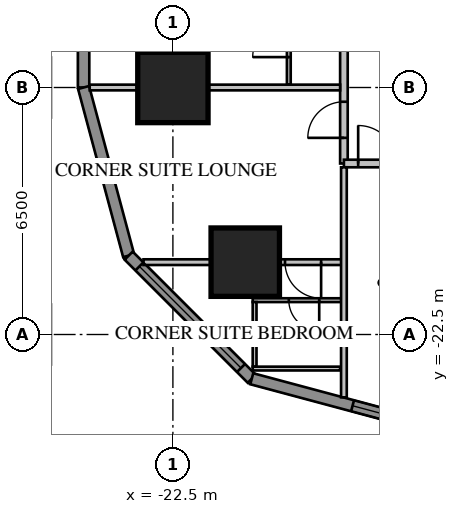
"""IFC4 building model, lengths in metres.
Left out: names, types, materials, properties, quantities, classifications, styles, units other than length and angle.
Written with IfcOpenShell. Run it as: python <this file> out.ifc"""

import sys

from ifc_helpers import new_model, si_unit, direction, frame, frame_2d, origin, origin_2d, place, context, subcontext, project, spatial, rectangle, extrude, element, fill, save


model = new_model("IFC4")
c1 = context("Model", 3, precision=1e-05, world=origin(), true_north=direction((0.0, 1.0)))
c2 = subcontext(c1, "Body", "Model", "MODEL_VIEW")
j1 = project(units=[si_unit("LENGTHUNIT", "METRE"), si_unit("PLANEANGLEUNIT", "RADIAN")], contexts=[c1])
p1 = place(None, origin())
s1 = spatial("IfcSite", under=j1, at=p1, CompositionType="ELEMENT")
p2 = place(p1, origin())
s2 = spatial("IfcBuilding", under=s1, at=p2, CompositionType="ELEMENT")
p3 = place(p2, frame((0.0, 0.0, 31.4)))
s3 = spatial("IfcBuildingStorey", under=s2, at=p3, CompositionType="ELEMENT", Elevation=31.4)
p4 = place(p3, frame((-22.5, -16.0, 0.0), z_axis=(0.0, 0.0, 1.0), x_axis=(1.0, 0.0, 0.0)))
e1 = element("IfcColumn", 1, at=p4, inside=s3, PredefinedType="COLUMN", context=c2, shape_type="SweptSolid", body=[
    extrude(rectangle(XDim=1.85, YDim=1.85, at=origin_2d()), origin(), (0.0, 0.0, 1.0), 3.85),
])
p5 = place(p3, frame((-20.596, -20.596, 0.0), z_axis=(0.0, 0.0, 1.0), x_axis=(1.0, 0.0, 0.0)))
e2 = element("IfcColumn", 2, at=p5, inside=s3, PredefinedType="COLUMN", context=c2, shape_type="SweptSolid", body=[
    extrude(rectangle(XDim=1.8, YDim=1.8, at=origin_2d()), origin(), (0.0, 0.0, 1.0), 3.85),
])
p6 = place(p3, frame((-24.85, 16.0, 0.0), z_axis=(0.0, 0.0, 1.0), x_axis=(0.0, -1.0, 0.0)))
e3 = element("IfcWall", 3, at=p6, inside=s3, PredefinedType="SOLIDWALL", context=c2, shape_type="SweptSolid", body=[
    extrude(rectangle(XDim=32.0, YDim=0.3, at=frame_2d((16.0, 0.0))), origin(), (0.0, 0.0, 1.0), 3.65),
])
p7 = place(p6, frame((1.2, 0.0, 0.75)))
e4 = element("IfcOpeningElement", 4, at=p7, cuts=e3, PredefinedType="OPENING", context=c2, shape_type="SweptSolid", body=[
    extrude(rectangle(XDim=1.6, YDim=1.8, at=frame_2d((0.8, 0.9))), frame((0.0, 0.17, 0.0), z_axis=(0.0, -1.0, 0.0), x_axis=(1.0, 0.0, 0.0)), (0.0, 0.0, 1.0), 0.34),
])
p8 = place(p6, frame((5.2, 0.0, 0.75)))
e5 = element("IfcOpeningElement", 5, at=p8, cuts=e3, PredefinedType="OPENING", context=c2, shape_type="SweptSolid", body=[
    extrude(rectangle(XDim=1.6, YDim=1.8, at=frame_2d((0.8, 0.9))), frame((0.0, 0.17, 0.0), z_axis=(0.0, -1.0, 0.0), x_axis=(1.0, 0.0, 0.0)), (0.0, 0.0, 1.0), 0.34),
])
p9 = place(p6, frame((17.2, 0.0, 0.75)))
e6 = element("IfcOpeningElement", 6, at=p9, cuts=e3, PredefinedType="OPENING", context=c2, shape_type="SweptSolid", body=[
    extrude(rectangle(XDim=1.6, YDim=1.8, at=frame_2d((0.8, 0.9))), frame((0.0, 0.17, 0.0), z_axis=(0.0, -1.0, 0.0), x_axis=(1.0, 0.0, 0.0)), (0.0, 0.0, 1.0), 0.34),
])
p10 = place(p6, frame((21.2, 0.0, 0.75)))
e7 = element("IfcOpeningElement", 7, at=p10, cuts=e3, PredefinedType="OPENING", context=c2, shape_type="SweptSolid", body=[
    extrude(rectangle(XDim=1.6, YDim=1.8, at=frame_2d((0.8, 0.9))), frame((0.0, 0.17, 0.0), z_axis=(0.0, -1.0, 0.0), x_axis=(1.0, 0.0, 0.0)), (0.0, 0.0, 1.0), 0.34),
])
p11 = place(p6, frame((25.2, 0.0, 0.75)))
e8 = element("IfcOpeningElement", 8, at=p11, cuts=e3, PredefinedType="OPENING", context=c2, shape_type="SweptSolid", body=[
    extrude(rectangle(XDim=1.6, YDim=1.8, at=frame_2d((0.8, 0.9))), frame((0.0, 0.17, 0.0), z_axis=(0.0, -1.0, 0.0), x_axis=(1.0, 0.0, 0.0)), (0.0, 0.0, 1.0), 0.34),
])
p12 = place(p6, frame((29.2, 0.0, 0.75)))
e9 = element("IfcOpeningElement", 9, at=p12, cuts=e3, PredefinedType="OPENING", context=c2, shape_type="SweptSolid", body=[
    extrude(rectangle(XDim=1.6, YDim=1.8, at=frame_2d((0.8, 0.9))), frame((0.0, 0.17, 0.0), z_axis=(0.0, -1.0, 0.0), x_axis=(1.0, 0.0, 0.0)), (0.0, 0.0, 1.0), 0.34),
])
p13 = place(p6, frame((8.8, 0.0, 0.75)))
e10 = element("IfcOpeningElement", 10, at=p13, cuts=e3, PredefinedType="OPENING", context=c2, shape_type="SweptSolid", body=[
    extrude(rectangle(XDim=2.4, YDim=1.8, at=frame_2d((1.2, 0.9))), frame((0.0, 0.17, 0.0), z_axis=(0.0, -1.0, 0.0), x_axis=(1.0, 0.0, 0.0)), (0.0, 0.0, 1.0), 0.34),
])
p14 = place(p6, frame((13.812, 0.0, 0.0)))
e11 = element("IfcOpeningElement", 11, at=p14, cuts=e3, PredefinedType="OPENING", context=c2, shape_type="SweptSolid", body=[
    extrude(rectangle(XDim=1.0, YDim=2.4, at=frame_2d((0.5, 1.2))), frame((0.0, 0.17, 0.0), z_axis=(0.0, -1.0, 0.0), x_axis=(1.0, 0.0, 0.0)), (0.0, 0.0, 1.0), 0.34),
])
p15 = place(p3, frame((-24.85, -16.0, 0.0), z_axis=(0.0, 0.0, 1.0), x_axis=(0.258839972501, -0.965920218567, 0.0)))
e12 = element("IfcWall", 12, at=p15, inside=s3, PredefinedType="SOLIDWALL", context=c2, shape_type="SweptSolid", body=[
    extrude(rectangle(XDim=4.581, YDim=0.3, at=frame_2d((2.291, 0.0))), origin(), (0.0, 0.0, 1.0), 3.65),
])
p16 = place(p3, frame((-23.664, -20.425, 0.0), z_axis=(0.0, 0.0, 1.0), x_axis=(0.707106781187, -0.707106781187, 0.0)))
e13 = element("IfcWall", 13, at=p16, inside=s3, PredefinedType="SOLIDWALL", context=c2, shape_type="SweptSolid", body=[
    extrude(rectangle(XDim=4.581, YDim=0.3, at=frame_2d((2.291, 0.0))), origin(), (0.0, 0.0, 1.0), 3.65),
])
p17 = place(p16, frame((0.4, 0.0, 0.75)))
e14 = element("IfcOpeningElement", 14, at=p17, cuts=e13, PredefinedType="OPENING", context=c2, shape_type="SweptSolid", body=[
    extrude(rectangle(XDim=3.781, YDim=1.8, at=frame_2d((1.891, 0.9))), frame((0.0, 0.17, 0.0), z_axis=(0.0, -1.0, 0.0), x_axis=(1.0, 0.0, 0.0)), (0.0, 0.0, 1.0), 0.34),
])
p18 = place(p3, frame((-20.425, -23.664, 0.0), z_axis=(0.0, 0.0, 1.0), x_axis=(0.965920218567, -0.258839972501, 0.0)))
e15 = element("IfcWall", 15, at=p18, inside=s3, PredefinedType="SOLIDWALL", context=c2, shape_type="SweptSolid", body=[
    extrude(rectangle(XDim=4.581, YDim=0.3, at=frame_2d((2.291, 0.0))), origin(), (0.0, 0.0, 1.0), 3.65),
])
p19 = place(p18, frame((2.746, 0.0, 0.75)))
e16 = element("IfcOpeningElement", 16, at=p19, cuts=e15, PredefinedType="OPENING", context=c2, shape_type="SweptSolid", body=[
    extrude(rectangle(XDim=1.6, YDim=1.8, at=frame_2d((0.8, 0.9))), frame((0.0, 0.17, 0.0), z_axis=(0.0, -1.0, 0.0), x_axis=(1.0, 0.0, 0.0)), (0.0, 0.0, 1.0), 0.34),
])
p20 = place(p3, frame((-18.0, 18.0, 0.0), z_axis=(0.0, 0.0, 1.0), x_axis=(0.0, -1.0, 0.0)))
e17 = element("IfcWall", 17, at=p20, inside=s3, PredefinedType="PARTITIONING", context=c2, shape_type="SweptSolid", body=[
    extrude(rectangle(XDim=36.0, YDim=0.2, at=frame_2d((18.0, 0.0))), origin(), (0.0, 0.0, 1.0), 3.65),
])
p21 = place(p20, frame((10.4, 0.0, 0.0)))
e18 = element("IfcOpeningElement", 18, at=p21, cuts=e17, PredefinedType="OPENING", context=c2, shape_type="SweptSolid", body=[
    extrude(rectangle(XDim=1.0, YDim=2.1, at=frame_2d((0.5, 1.05))), frame((0.0, 0.12, 0.0), z_axis=(0.0, -1.0, 0.0), x_axis=(1.0, 0.0, 0.0)), (0.0, 0.0, 1.0), 0.24),
])
p22 = place(p20, frame((0.375, 0.0, 0.0)))
e19 = element("IfcOpeningElement", 19, at=p22, cuts=e17, PredefinedType="OPENING", context=c2, shape_type="SweptSolid", body=[
    extrude(rectangle(XDim=1.0, YDim=2.1, at=frame_2d((0.5, 1.05))), frame((0.0, 0.12, 0.0), z_axis=(0.0, -1.0, 0.0), x_axis=(1.0, 0.0, 0.0)), (0.0, 0.0, 1.0), 0.24),
])
p23 = place(p20, frame((34.375, 0.0, 0.0)))
e20 = element("IfcOpeningElement", 20, at=p23, cuts=e17, PredefinedType="OPENING", context=c2, shape_type="SweptSolid", body=[
    extrude(rectangle(XDim=0.95, YDim=2.1, at=frame_2d((0.475, 1.05))), frame((0.0, 0.12, 0.0), z_axis=(0.0, -1.0, 0.0), x_axis=(1.0, 0.0, 0.0)), (0.0, 0.0, 1.0), 0.24),
])
p24 = place(p3, frame((-19.45, 15.925, 0.0), z_axis=(0.0, 0.0, 1.0), x_axis=(0.0, -1.0, 0.0)))
e21 = element("IfcWall", 21, at=p24, inside=s3, PredefinedType="PARTITIONING", context=c2, shape_type="SweptSolid", body=[
    extrude(rectangle(XDim=31.85, YDim=0.1, at=frame_2d((15.925, 0.0))), origin(), (0.0, 0.0, 1.0), 3.65),
])
p25 = place(p24, frame((10.125, 0.0, 0.0)))
e22 = element("IfcOpeningElement", 22, at=p25, cuts=e21, PredefinedType="OPENING", context=c2, shape_type="SweptSolid", body=[
    extrude(rectangle(XDim=1.0, YDim=2.1, at=frame_2d((0.5, 1.05))), frame((0.0, 0.07, 0.0), z_axis=(0.0, -1.0, 0.0), x_axis=(1.0, 0.0, 0.0)), (0.0, 0.0, 1.0), 0.14),
])
p26 = place(p24, frame((8.3, 0.0, 0.0)))
e23 = element("IfcOpeningElement", 23, at=p26, cuts=e21, PredefinedType="OPENING", context=c2, shape_type="SweptSolid", body=[
    extrude(rectangle(XDim=0.8, YDim=2.1, at=frame_2d((0.4, 1.05))), frame((0.0, 0.07, 0.0), z_axis=(0.0, -1.0, 0.0), x_axis=(1.0, 0.0, 0.0)), (0.0, 0.0, 1.0), 0.14),
])
p27 = place(p24, frame((0.3, 0.0, 0.0)))
e24 = element("IfcOpeningElement", 24, at=p27, cuts=e21, PredefinedType="OPENING", context=c2, shape_type="SweptSolid", body=[
    extrude(rectangle(XDim=0.95, YDim=2.1, at=frame_2d((0.475, 1.05))), frame((0.0, 0.07, 0.0), z_axis=(0.0, -1.0, 0.0), x_axis=(1.0, 0.0, 0.0)), (0.0, 0.0, 1.0), 0.14),
])
p28 = place(p24, frame((6.175, 0.0, 0.0)))
e25 = element("IfcOpeningElement", 25, at=p28, cuts=e21, PredefinedType="OPENING", context=c2, shape_type="SweptSolid", body=[
    extrude(rectangle(XDim=0.95, YDim=2.1, at=frame_2d((0.475, 1.05))), frame((0.0, 0.07, 0.0), z_axis=(0.0, -1.0, 0.0), x_axis=(1.0, 0.0, 0.0)), (0.0, 0.0, 1.0), 0.14),
])
p29 = place(p24, frame((16.3, 0.0, 0.0)))
e26 = element("IfcOpeningElement", 26, at=p29, cuts=e21, PredefinedType="OPENING", context=c2, shape_type="SweptSolid", body=[
    extrude(rectangle(XDim=0.95, YDim=2.1, at=frame_2d((0.475, 1.05))), frame((0.0, 0.07, 0.0), z_axis=(0.0, -1.0, 0.0), x_axis=(1.0, 0.0, 0.0)), (0.0, 0.0, 1.0), 0.14),
])
p30 = place(p24, frame((22.175, 0.0, 0.0)))
e27 = element("IfcOpeningElement", 27, at=p30, cuts=e21, PredefinedType="OPENING", context=c2, shape_type="SweptSolid", body=[
    extrude(rectangle(XDim=0.95, YDim=2.1, at=frame_2d((0.475, 1.05))), frame((0.0, 0.07, 0.0), z_axis=(0.0, -1.0, 0.0), x_axis=(1.0, 0.0, 0.0)), (0.0, 0.0, 1.0), 0.14),
])
p31 = place(p24, frame((24.3, 0.0, 0.0)))
e28 = element("IfcOpeningElement", 28, at=p31, cuts=e21, PredefinedType="OPENING", context=c2, shape_type="SweptSolid", body=[
    extrude(rectangle(XDim=0.95, YDim=2.1, at=frame_2d((0.475, 1.05))), frame((0.0, 0.07, 0.0), z_axis=(0.0, -1.0, 0.0), x_axis=(1.0, 0.0, 0.0)), (0.0, 0.0, 1.0), 0.14),
])
p32 = place(p24, frame((30.175, 0.0, 0.0)))
e29 = element("IfcOpeningElement", 29, at=p32, cuts=e21, PredefinedType="OPENING", context=c2, shape_type="SweptSolid", body=[
    extrude(rectangle(XDim=0.95, YDim=2.1, at=frame_2d((0.475, 1.05))), frame((0.0, 0.07, 0.0), z_axis=(0.0, -1.0, 0.0), x_axis=(1.0, 0.0, 0.0)), (0.0, 0.0, 1.0), 0.14),
])
p33 = place(p3, frame((-18.1, -16.0, 0.0), z_axis=(0.0, 0.0, 1.0), x_axis=(-1.0, 0.0, 0.0)))
e30 = element("IfcWall", 30, at=p33, inside=s3, PredefinedType="PARTITIONING", context=c2, shape_type="SweptSolid", body=[
    extrude(rectangle(XDim=6.589, YDim=0.15, at=frame_2d((3.295, 0.0))), origin(), (0.0, 0.0, 1.0), 3.65),
])
p34 = place(p3, frame((-18.065, -21.596, 0.0), z_axis=(0.0, 0.0, 1.0), x_axis=(-1.0, 0.0, 0.0)))
e31 = element("IfcWall", 31, at=p34, inside=s3, PredefinedType="PARTITIONING", context=c2, shape_type="SweptSolid", body=[
    extrude(rectangle(XDim=2.335, YDim=0.1, at=frame_2d((1.167, 0.0))), origin(), (0.0, 0.0, 1.0), 3.65),
])
p35 = place(p34, frame((0.585, 0.0, 0.0)))
e32 = element("IfcOpeningElement", 32, at=p35, cuts=e31, PredefinedType="OPENING", context=c2, shape_type="SweptSolid", body=[
    extrude(rectangle(XDim=0.8, YDim=2.1, at=frame_2d((0.4, 1.05))), frame((0.0, 0.07, 0.0), z_axis=(0.0, -1.0, 0.0), x_axis=(1.0, 0.0, 0.0)), (0.0, 0.0, 1.0), 0.14),
])
p36 = place(p3, frame((-20.35, -21.646, 0.0), z_axis=(0.0, 0.0, 1.0), x_axis=(0.0, -1.0, 0.0)))
e33 = element("IfcWall", 33, at=p36, inside=s3, PredefinedType="PARTITIONING", context=c2, shape_type="SweptSolid", body=[
    extrude(rectangle(XDim=1.7, YDim=0.1, at=frame_2d((0.85, 0.0))), origin(), (0.0, 0.0, 1.0), 3.65),
])
p37 = place(p3, frame((-18.1, -23.396, 0.0), z_axis=(0.0, 0.0, 1.0), x_axis=(-1.0, 0.0, 0.0)))
e34 = element("IfcWall", 34, at=p37, inside=s3, PredefinedType="PARTITIONING", context=c2, shape_type="SweptSolid", body=[
    extrude(rectangle(XDim=2.3, YDim=0.1, at=frame_2d((1.15, 0.0))), origin(), (0.0, 0.0, 1.0), 3.65),
])
p38 = place(p3, frame((-18.065, -20.596, 0.0), z_axis=(0.0, 0.0, 1.0), x_axis=(-1.0, 0.0, 0.0)))
e35 = element("IfcWall", 35, at=p38, inside=s3, PredefinedType="PARTITIONING", context=c2, shape_type="SweptSolid", body=[
    extrude(rectangle(XDim=5.209, YDim=0.15, at=frame_2d((2.604, 0.0))), origin(), (0.0, 0.0, 1.0), 3.65),
])
p39 = place(p38, frame((0.535, 0.0, 0.0)))
e36 = element("IfcOpeningElement", 36, at=p39, cuts=e35, PredefinedType="OPENING", context=c2, shape_type="SweptSolid", body=[
    extrude(rectangle(XDim=0.95, YDim=2.1, at=frame_2d((0.475, 1.05))), frame((0.0, 0.095, 0.0), z_axis=(0.0, -1.0, 0.0), x_axis=(1.0, 0.0, 0.0)), (0.0, 0.0, 1.0), 0.19),
])
p40 = place(p3, frame((-18.0, -18.0, 0.0), z_axis=(0.0, 0.0, 1.0), x_axis=(1.0, 0.0, 0.0)))
e37 = element("IfcWall", 37, at=p40, inside=s3, PredefinedType="PARTITIONING", context=c2, shape_type="SweptSolid", body=[
    extrude(rectangle(XDim=36.0, YDim=0.2, at=frame_2d((18.0, 0.0))), origin(), (0.0, 0.0, 1.0), 3.65),
])
p41 = place(p40, frame((0.375, 0.0, 0.0)))
e38 = element("IfcOpeningElement", 38, at=p41, cuts=e37, PredefinedType="OPENING", context=c2, shape_type="SweptSolid", body=[
    extrude(rectangle(XDim=1.0, YDim=2.1, at=frame_2d((0.5, 1.05))), frame((0.0, 0.12, 0.0), z_axis=(0.0, -1.0, 0.0), x_axis=(1.0, 0.0, 0.0)), (0.0, 0.0, 1.0), 0.24),
])
p42 = place(p40, frame((2.45, 0.0, 0.0)))
e39 = element("IfcOpeningElement", 39, at=p42, cuts=e37, PredefinedType="OPENING", context=c2, shape_type="SweptSolid", body=[
    extrude(rectangle(XDim=0.8, YDim=2.1, at=frame_2d((0.4, 1.05))), frame((0.0, 0.12, 0.0), z_axis=(0.0, -1.0, 0.0), x_axis=(1.0, 0.0, 0.0)), (0.0, 0.0, 1.0), 0.24),
])
p43 = place(p40, frame((4.05, 0.0, 0.0)))
e40 = element("IfcOpeningElement", 40, at=p43, cuts=e37, PredefinedType="OPENING", context=c2, shape_type="SweptSolid", body=[
    extrude(rectangle(XDim=1.0, YDim=2.1, at=frame_2d((0.5, 1.05))), frame((0.0, 0.12, 0.0), z_axis=(0.0, -1.0, 0.0), x_axis=(1.0, 0.0, 0.0)), (0.0, 0.0, 1.0), 0.24),
])
p44 = place(p40, frame((6.45, 0.0, 0.0)))
e41 = element("IfcOpeningElement", 41, at=p44, cuts=e37, PredefinedType="OPENING", context=c2, shape_type="SweptSolid", body=[
    extrude(rectangle(XDim=0.9, YDim=2.1, at=frame_2d((0.45, 1.05))), frame((0.0, 0.12, 0.0), z_axis=(0.0, -1.0, 0.0), x_axis=(1.0, 0.0, 0.0)), (0.0, 0.0, 1.0), 0.24),
])
p45 = place(p40, frame((8.15, 0.0, 0.0)))
e42 = element("IfcOpeningElement", 42, at=p45, cuts=e37, PredefinedType="OPENING", context=c2, shape_type="SweptSolid", body=[
    extrude(rectangle(XDim=1.0, YDim=2.1, at=frame_2d((0.5, 1.05))), frame((0.0, 0.12, 0.0), z_axis=(0.0, -1.0, 0.0), x_axis=(1.0, 0.0, 0.0)), (0.0, 0.0, 1.0), 0.24),
])
p46 = place(p40, frame((18.375, 0.0, 0.0)))
e43 = element("IfcOpeningElement", 43, at=p46, cuts=e37, PredefinedType="OPENING", context=c2, shape_type="SweptSolid", body=[
    extrude(rectangle(XDim=0.95, YDim=2.1, at=frame_2d((0.475, 1.05))), frame((0.0, 0.12, 0.0), z_axis=(0.0, -1.0, 0.0), x_axis=(1.0, 0.0, 0.0)), (0.0, 0.0, 1.0), 0.24),
])
p47 = place(p40, frame((24.25, 0.0, 0.0)))
e44 = element("IfcOpeningElement", 44, at=p47, cuts=e37, PredefinedType="OPENING", context=c2, shape_type="SweptSolid", body=[
    extrude(rectangle(XDim=0.95, YDim=2.1, at=frame_2d((0.475, 1.05))), frame((0.0, 0.12, 0.0), z_axis=(0.0, -1.0, 0.0), x_axis=(1.0, 0.0, 0.0)), (0.0, 0.0, 1.0), 0.24),
])
p48 = place(p40, frame((26.375, 0.0, 0.0)))
e45 = element("IfcOpeningElement", 45, at=p48, cuts=e37, PredefinedType="OPENING", context=c2, shape_type="SweptSolid", body=[
    extrude(rectangle(XDim=0.95, YDim=2.1, at=frame_2d((0.475, 1.05))), frame((0.0, 0.12, 0.0), z_axis=(0.0, -1.0, 0.0), x_axis=(1.0, 0.0, 0.0)), (0.0, 0.0, 1.0), 0.24),
])
p49 = place(p40, frame((32.25, 0.0, 0.0)))
e46 = element("IfcOpeningElement", 46, at=p49, cuts=e37, PredefinedType="OPENING", context=c2, shape_type="SweptSolid", body=[
    extrude(rectangle(XDim=0.95, YDim=2.1, at=frame_2d((0.475, 1.05))), frame((0.0, 0.12, 0.0), z_axis=(0.0, -1.0, 0.0), x_axis=(1.0, 0.0, 0.0)), (0.0, 0.0, 1.0), 0.24),
])
p50 = place(p40, frame((34.375, 0.0, 0.0)))
e47 = element("IfcOpeningElement", 47, at=p50, cuts=e37, PredefinedType="OPENING", context=c2, shape_type="SweptSolid", body=[
    extrude(rectangle(XDim=0.95, YDim=2.1, at=frame_2d((0.475, 1.05))), frame((0.0, 0.12, 0.0), z_axis=(0.0, -1.0, 0.0), x_axis=(1.0, 0.0, 0.0)), (0.0, 0.0, 1.0), 0.24),
])
p51 = place(p40, frame((11.2, 0.0, 0.0)))
e48 = element("IfcOpeningElement", 48, at=p51, cuts=e37, PredefinedType="OPENING", context=c2, shape_type="SweptSolid", body=[
    extrude(rectangle(XDim=1.0, YDim=2.1, at=frame_2d((0.5, 1.05))), frame((0.0, 0.12, 0.0), z_axis=(0.0, -1.0, 0.0), x_axis=(1.0, 0.0, 0.0)), (0.0, 0.0, 1.0), 0.24),
])
p52 = place(p3, frame((-18.0, -18.1, 0.0), z_axis=(0.0, 0.0, 1.0), x_axis=(0.0, -1.0, 0.0)))
e49 = element("IfcWall", 49, at=p52, inside=s3, PredefinedType="PARTITIONING", context=c2, shape_type="SweptSolid", body=[
    extrude(rectangle(XDim=6.053, YDim=0.15, at=frame_2d((3.027, 0.0))), origin(), (0.0, 0.0, 1.0), 3.65),
])
p53 = place(p17, origin())
e50 = element("IfcWindow", 50, at=p53, inside=s3, PartitioningType="SINGLE_PANEL", PredefinedType="WINDOW", context=c2, shape_type="SweptSolid", body=[
    extrude(rectangle(XDim=3.781, YDim=1.8, at=frame_2d((1.891, 0.9))), frame((0.0, 0.03, 0.0), z_axis=(0.0, -1.0, 0.0), x_axis=(1.0, 0.0, 0.0)), (0.0, 0.0, 1.0), 0.06),
])
fill(e14, e50)
p54 = place(p19, origin())
e51 = element("IfcWindow", 51, at=p54, inside=s3, PartitioningType="SINGLE_PANEL", PredefinedType="WINDOW", context=c2, shape_type="SweptSolid", body=[
    extrude(rectangle(XDim=1.6, YDim=1.8, at=frame_2d((0.8, 0.9))), frame((0.0, 0.03, 0.0), z_axis=(0.0, -1.0, 0.0), x_axis=(1.0, 0.0, 0.0)), (0.0, 0.0, 1.0), 0.06),
])
fill(e16, e51)
p55 = place(p32, origin())
e52 = element("IfcDoor", 52, at=p55, inside=s3, OperationType="SINGLE_SWING_RIGHT", PredefinedType="DOOR", context=c2, shape_type="SweptSolid", body=[
    extrude(rectangle(XDim=0.95, YDim=2.1, at=frame_2d((0.475, 1.05))), frame((0.0, 0.025, 0.0), z_axis=(0.0, -1.0, 0.0), x_axis=(1.0, 0.0, 0.0)), (0.0, 0.0, 1.0), 0.05),
])
fill(e29, e52)
p56 = place(p23, origin())
e53 = element("IfcDoor", 53, at=p56, inside=s3, OperationType="SINGLE_SWING_RIGHT", PredefinedType="DOOR", context=c2, shape_type="SweptSolid", body=[
    extrude(rectangle(XDim=0.95, YDim=2.1, at=frame_2d((0.475, 1.05))), frame((0.0, 0.025, 0.0), z_axis=(0.0, -1.0, 0.0), x_axis=(1.0, 0.0, 0.0)), (0.0, 0.0, 1.0), 0.05),
])
fill(e20, e53)
p57 = place(p35, origin())
e54 = element("IfcDoor", 54, at=p57, inside=s3, OperationType="SINGLE_SWING_LEFT", PredefinedType="DOOR", context=c2, shape_type="SweptSolid", body=[
    extrude(rectangle(XDim=0.8, YDim=2.1, at=frame_2d((0.4, 1.05))), frame((0.0, 0.025, 0.0), z_axis=(0.0, -1.0, 0.0), x_axis=(1.0, 0.0, 0.0)), (0.0, 0.0, 1.0), 0.05),
])
fill(e32, e54)
p58 = place(p39, origin())
e55 = element("IfcDoor", 55, at=p58, inside=s3, OperationType="SINGLE_SWING_LEFT", PredefinedType="DOOR", context=c2, shape_type="SweptSolid", body=[
    extrude(rectangle(XDim=0.95, YDim=2.1, at=frame_2d((0.475, 1.05))), frame((0.0, 0.025, 0.0), z_axis=(0.0, -1.0, 0.0), x_axis=(1.0, 0.0, 0.0)), (0.0, 0.0, 1.0), 0.05),
])
fill(e36, e55)
p59 = place(p41, origin())
e56 = element("IfcDoor", 56, at=p59, inside=s3, OperationType="SINGLE_SWING_LEFT", PredefinedType="DOOR", context=c2, shape_type="SweptSolid", body=[
    extrude(rectangle(XDim=1.0, YDim=2.1, at=frame_2d((0.5, 1.05))), frame((0.0, 0.025, 0.0), z_axis=(0.0, -1.0, 0.0), x_axis=(1.0, 0.0, 0.0)), (0.0, 0.0, 1.0), 0.05),
])
fill(e38, e56)
save(model, sys.argv[1])
